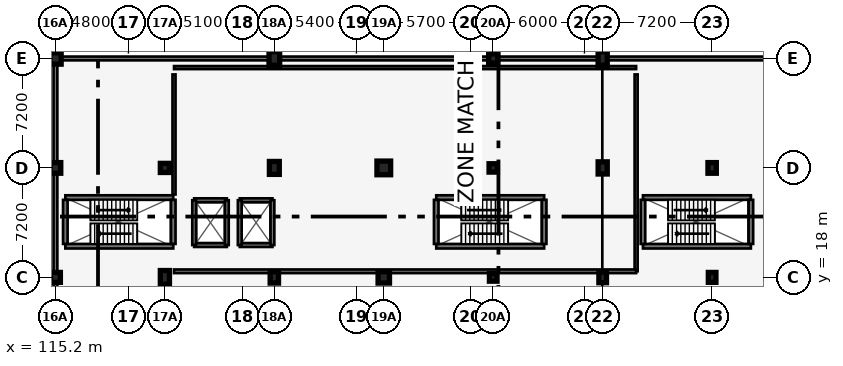
"""IFC4 building model, lengths in metres.
Left out: names, types, materials, properties, quantities, classifications, styles, units other than length and angle.
Written with IfcOpenShell. Run it as: python <this file> out.ifc"""

import sys

from ifc_helpers import new_model, si_unit, direction, frame, frame_2d, origin, origin_2d, place, context, subcontext, project, spatial, rectangle, circle, extrude, element, fill, save


model = new_model("IFC4")
c1 = context("Model", 3, precision=1e-05, world=origin(), true_north=direction((0.0, 1.0)))
c2 = subcontext(c1, "Body", "Model", "MODEL_VIEW")
j1 = project(units=[si_unit("LENGTHUNIT", "METRE"), si_unit("PLANEANGLEUNIT", "RADIAN")], contexts=[c1])
p1 = place(None, origin())
s1 = spatial("IfcSite", under=j1, at=p1, CompositionType="ELEMENT")
p2 = place(p1, origin())
s2 = spatial("IfcBuilding", under=s1, at=p2, CompositionType="ELEMENT")
p3 = place(p2, frame((0.0, 0.0, 13.2)))
s3 = spatial("IfcBuildingStorey", under=s2, at=p3, CompositionType="ELEMENT", Elevation=13.2)
p4 = place(p3, frame((115.2, 18.0, 0.0), z_axis=(0.0, 0.0, 1.0), x_axis=(1.0, 0.0, 0.0)))
e1 = element("IfcColumn", 1, at=p4, inside=s3, PredefinedType="COLUMN", context=c2, shape_type="SweptSolid", body=[
    extrude(rectangle(XDim=0.65, YDim=0.65, at=origin_2d()), origin(), (0.0, 0.0, 1.0), 4.2),
])
p5 = place(p3, frame((115.2, 25.2, 0.0), z_axis=(0.0, 0.0, 1.0), x_axis=(1.0, 0.0, 0.0)))
e2 = element("IfcColumn", 2, at=p5, inside=s3, PredefinedType="COLUMN", context=c2, shape_type="SweptSolid", body=[
    extrude(rectangle(XDim=0.7, YDim=0.7, at=origin_2d()), origin(), (0.0, 0.0, 1.0), 4.2),
])
p6 = place(p3, frame((115.2, 32.4, 0.0), z_axis=(0.0, 0.0, 1.0), x_axis=(1.0, 0.0, 0.0)))
e3 = element("IfcColumn", 3, at=p6, inside=s3, PredefinedType="COLUMN", context=c2, shape_type="SweptSolid", body=[
    extrude(rectangle(XDim=0.75, YDim=0.75, at=origin_2d()), origin(), (0.0, 0.0, 1.0), 4.2),
])
p7 = place(p3, frame((122.4, 18.0, 0.0), z_axis=(0.0, 0.0, 1.0), x_axis=(1.0, 0.0, 0.0)))
e4 = element("IfcColumn", 4, at=p7, inside=s3, PredefinedType="COLUMN", context=c2, shape_type="SweptSolid", body=[
    extrude(rectangle(XDim=0.6, YDim=0.9, at=origin_2d()), origin(), (0.0, 0.0, 1.0), 4.2),
])
p8 = place(p3, frame((122.4, 25.2, 0.0), z_axis=(0.0, 0.0, 1.0), x_axis=(1.0, 0.0, 0.0)))
e5 = element("IfcColumn", 5, at=p8, inside=s3, PredefinedType="COLUMN", context=c2, shape_type="SweptSolid", body=[
    extrude(circle(Radius=0.3, at=origin_2d()), origin(), (0.0, 0.0, 1.0), 4.2),
])
p9 = place(p3, frame((129.6, 18.0, 0.0), z_axis=(0.0, 0.0, 1.0), x_axis=(1.0, 0.0, 0.0)))
e6 = element("IfcColumn", 6, at=p9, inside=s3, PredefinedType="COLUMN", context=c2, shape_type="SweptSolid", body=[
    extrude(rectangle(XDim=0.55, YDim=0.75, at=origin_2d()), origin(), (0.0, 0.0, 1.0), 4.2),
])
p10 = place(p3, frame((129.6, 25.2, 0.0), z_axis=(0.0, 0.0, 1.0), x_axis=(1.0, 0.0, 0.0)))
e7 = element("IfcColumn", 7, at=p10, inside=s3, PredefinedType="COLUMN", context=c2, shape_type="SweptSolid", body=[
    extrude(rectangle(XDim=0.65, YDim=0.85, at=origin_2d()), origin(), (0.0, 0.0, 1.0), 4.2),
])
p11 = place(p3, frame((129.6, 32.4, 0.0), z_axis=(0.0, 0.0, 1.0), x_axis=(1.0, 0.0, 0.0)))
e8 = element("IfcColumn", 8, at=p11, inside=s3, PredefinedType="COLUMN", context=c2, shape_type="SweptSolid", body=[
    extrude(rectangle(XDim=0.7, YDim=0.9, at=origin_2d()), origin(), (0.0, 0.0, 1.0), 4.2),
])
p12 = place(p3, frame((136.8, 18.0, 0.0), z_axis=(0.0, 0.0, 1.0), x_axis=(1.0, 0.0, 0.0)))
e9 = element("IfcColumn", 9, at=p12, inside=s3, PredefinedType="COLUMN", context=c2, shape_type="SweptSolid", body=[
    extrude(circle(Radius=0.375, at=origin_2d()), origin(), (0.0, 0.0, 1.0), 4.2),
])
p13 = place(p3, frame((136.8, 25.2, 0.0), z_axis=(0.0, 0.0, 1.0), x_axis=(1.0, 0.0, 0.0)))
e10 = element("IfcColumn", 10, at=p13, inside=s3, PredefinedType="COLUMN", context=c2, shape_type="SweptSolid", body=[
    extrude(circle(Radius=0.45, at=origin_2d()), origin(), (0.0, 0.0, 1.0), 4.2),
])
p14 = place(p3, frame((144.0, 18.0, 0.0), z_axis=(0.0, 0.0, 1.0), x_axis=(1.0, 0.0, 0.0)))
e11 = element("IfcColumn", 11, at=p14, inside=s3, PredefinedType="COLUMN", context=c2, shape_type="SweptSolid", body=[
    extrude(rectangle(XDim=0.5, YDim=0.5, at=origin_2d()), origin(), (0.0, 0.0, 1.0), 4.2),
])
p15 = place(p3, frame((144.0, 25.2, 0.0), z_axis=(0.0, 0.0, 1.0), x_axis=(1.0, 0.0, 0.0)))
e12 = element("IfcColumn", 12, at=p15, inside=s3, PredefinedType="COLUMN", context=c2, shape_type="SweptSolid", body=[
    extrude(rectangle(XDim=0.55, YDim=0.55, at=origin_2d()), origin(), (0.0, 0.0, 1.0), 4.2),
])
p16 = place(p3, frame((144.0, 32.4, 0.0), z_axis=(0.0, 0.0, 1.0), x_axis=(1.0, 0.0, 0.0)))
e13 = element("IfcColumn", 13, at=p16, inside=s3, PredefinedType="COLUMN", context=c2, shape_type="SweptSolid", body=[
    extrude(rectangle(XDim=0.6, YDim=0.6, at=origin_2d()), origin(), (0.0, 0.0, 1.0), 4.2),
])
p17 = place(p3, frame((151.2, 18.0, 0.0), z_axis=(0.0, 0.0, 1.0), x_axis=(1.0, 0.0, 0.0)))
e14 = element("IfcColumn", 14, at=p17, inside=s3, PredefinedType="COLUMN", context=c2, shape_type="SweptSolid", body=[
    extrude(rectangle(XDim=0.5, YDim=0.7, at=origin_2d()), origin(), (0.0, 0.0, 1.0), 4.2),
])
p18 = place(p3, frame((151.2, 25.2, 0.0), z_axis=(0.0, 0.0, 1.0), x_axis=(1.0, 0.0, 0.0)))
e15 = element("IfcColumn", 15, at=p18, inside=s3, PredefinedType="COLUMN", context=c2, shape_type="SweptSolid", body=[
    extrude(rectangle(XDim=0.6, YDim=0.8, at=origin_2d()), origin(), (0.0, 0.0, 1.0), 4.2),
])
p19 = place(p3, frame((151.2, 32.4, 0.0), z_axis=(0.0, 0.0, 1.0), x_axis=(1.0, 0.0, 0.0)))
e16 = element("IfcColumn", 16, at=p19, inside=s3, PredefinedType="COLUMN", context=c2, shape_type="SweptSolid", body=[
    extrude(rectangle(XDim=0.6, YDim=0.9, at=origin_2d()), origin(), (0.0, 0.0, 1.0), 4.2),
])
p20 = place(p3, frame((158.4, 18.0, 0.0), z_axis=(0.0, 0.0, 1.0), x_axis=(1.0, 0.0, 0.0)))
e17 = element("IfcColumn", 17, at=p20, inside=s3, PredefinedType="COLUMN", context=c2, shape_type="SweptSolid", body=[
    extrude(rectangle(XDim=0.5, YDim=0.65, at=origin_2d()), origin(), (0.0, 0.0, 1.0), 4.2),
])
p21 = place(p3, frame((158.4, 25.2, 0.0), z_axis=(0.0, 0.0, 1.0), x_axis=(1.0, 0.0, 0.0)))
e18 = element("IfcColumn", 18, at=p21, inside=s3, PredefinedType="COLUMN", context=c2, shape_type="SweptSolid", body=[
    extrude(rectangle(XDim=0.55, YDim=0.7, at=origin_2d()), origin(), (0.0, 0.0, 1.0), 4.2),
])
p22 = place(p3, frame((115.2, 32.4, 0.0), z_axis=(0.0, 0.0, 1.0), x_axis=(0.0, -1.0, 0.0)))
e19 = element("IfcWall", 19, at=p22, inside=s3, PredefinedType="SOLIDWALL", context=c2, shape_type="SweptSolid", body=[
    extrude(rectangle(XDim=30.0, YDim=0.25, at=frame_2d((15.0, 0.0))), origin(), (0.0, 0.0, 1.0), 3.253),
])
p23 = place(p22, frame((18.0, 0.0, 0.0)))
e20 = element("IfcOpeningElement", 20, at=p23, cuts=e19, PredefinedType="OPENING", context=c2, shape_type="SweptSolid", body=[
    extrude(rectangle(XDim=1.1, YDim=2.15, at=frame_2d((0.55, 1.075))), frame((0.0, 0.135, 0.0), z_axis=(0.0, -1.0, 0.0), x_axis=(1.0, 0.0, 0.0)), (0.0, 0.0, 1.0), 0.27),
])
p24 = place(p3, frame((165.6, 32.4, 0.0), z_axis=(0.0, 0.0, 1.0), x_axis=(-1.0, 0.0, 0.0)))
e21 = element("IfcWall", 21, at=p24, inside=s3, PredefinedType="SOLIDWALL", context=c2, shape_type="SweptSolid", body=[
    extrude(rectangle(XDim=50.4, YDim=0.25, at=frame_2d((25.2, 0.0))), origin(), (0.0, 0.0, 1.0), 3.35),
])
p25 = place(p24, frame((2.2, 0.0, 0.78)))
e22 = element("IfcOpeningElement", 22, at=p25, cuts=e21, PredefinedType="OPENING", context=c2, shape_type="SweptSolid", body=[
    extrude(rectangle(XDim=1.35, YDim=1.75, at=frame_2d((0.675, 0.875))), frame((0.0, 0.135, 0.0), z_axis=(0.0, -1.0, 0.0), x_axis=(1.0, 0.0, 0.0)), (0.0, 0.0, 1.0), 0.27),
])
p26 = place(p24, frame((9.4, 0.0, 0.78)))
e23 = element("IfcOpeningElement", 23, at=p26, cuts=e21, PredefinedType="OPENING", context=c2, shape_type="SweptSolid", body=[
    extrude(rectangle(XDim=1.5, YDim=1.75, at=frame_2d((0.75, 0.875))), frame((0.0, 0.135, 0.0), z_axis=(0.0, -1.0, 0.0), x_axis=(1.0, 0.0, 0.0)), (0.0, 0.0, 1.0), 0.27),
])
p27 = place(p24, frame((16.6, 0.0, 0.78)))
e24 = element("IfcOpeningElement", 24, at=p27, cuts=e21, PredefinedType="OPENING", context=c2, shape_type="SweptSolid", body=[
    extrude(rectangle(XDim=1.65, YDim=1.8, at=frame_2d((0.825, 0.9))), frame((0.0, 0.135, 0.0), z_axis=(0.0, -1.0, 0.0), x_axis=(1.0, 0.0, 0.0)), (0.0, 0.0, 1.0), 0.27),
])
p28 = place(p24, frame((23.8, 0.0, 0.78)))
e25 = element("IfcOpeningElement", 25, at=p28, cuts=e21, PredefinedType="OPENING", context=c2, shape_type="SweptSolid", body=[
    extrude(rectangle(XDim=1.95, YDim=1.8, at=frame_2d((0.975, 0.9))), frame((0.0, 0.135, 0.0), z_axis=(0.0, -1.0, 0.0), x_axis=(1.0, 0.0, 0.0)), (0.0, 0.0, 1.0), 0.27),
])
p29 = place(p24, frame((31.0, 0.0, 0.78)))
e26 = element("IfcOpeningElement", 26, at=p29, cuts=e21, PredefinedType="OPENING", context=c2, shape_type="SweptSolid", body=[
    extrude(rectangle(XDim=2.1, YDim=1.8, at=frame_2d((1.05, 0.9))), frame((0.0, 0.135, 0.0), z_axis=(0.0, -1.0, 0.0), x_axis=(1.0, 0.0, 0.0)), (0.0, 0.0, 1.0), 0.27),
])
p30 = place(p24, frame((38.2, 0.0, 0.78)))
e27 = element("IfcOpeningElement", 27, at=p30, cuts=e21, PredefinedType="OPENING", context=c2, shape_type="SweptSolid", body=[
    extrude(rectangle(XDim=1.1, YDim=1.65, at=frame_2d((0.55, 0.825))), frame((0.0, 0.135, 0.0), z_axis=(0.0, -1.0, 0.0), x_axis=(1.0, 0.0, 0.0)), (0.0, 0.0, 1.0), 0.27),
])
p31 = place(p3, frame((115.85, 20.05, 0.0), z_axis=(0.0, 0.0, 1.0), x_axis=(1.0, 0.0, 0.0)))
e28 = element("IfcWall", 28, at=p31, inside=s3, PredefinedType="SHEAR", context=c2, shape_type="SweptSolid", body=[
    extrude(rectangle(XDim=7.1, YDim=0.3, at=frame_2d((3.55, 0.0))), origin(), (0.0, 0.0, 1.0), 3.45),
])
p32 = place(p31, frame((0.35, 0.0, 0.0)))
e29 = element("IfcOpeningElement", 29, at=p32, cuts=e28, PredefinedType="OPENING", context=c2, shape_type="SweptSolid", body=[
    extrude(rectangle(XDim=1.07, YDim=2.15, at=frame_2d((0.535, 1.075))), frame((0.0, 0.16, 0.0), z_axis=(0.0, -1.0, 0.0), x_axis=(1.0, 0.0, 0.0)), (0.0, 0.0, 1.0), 0.32),
])
p33 = place(p3, frame((122.95, 23.25, 0.0), z_axis=(0.0, 0.0, 1.0), x_axis=(-1.0, 0.0, 0.0)))
e30 = element("IfcWall", 30, at=p33, inside=s3, PredefinedType="SHEAR", context=c2, shape_type="SweptSolid", body=[
    extrude(rectangle(XDim=7.1, YDim=0.3, at=frame_2d((3.55, 0.0))), origin(), (0.0, 0.0, 1.0), 3.45),
])
for number, where, z_axis, x_axis in (
    (31, (122.95, 20.2, 0.0), (0.0, 0.0, 1.0), (0.0, 1.0, 0.0)),
    (32, (115.85, 23.1, 0.0), (0.0, 0.0, 1.0), (0.0, -1.0, 0.0)),
):
    element("IfcWall", number, at=place(p3, frame(where, z_axis=z_axis, x_axis=x_axis)), inside=s3, PredefinedType="SHEAR", context=c2, shape_type="SweptSolid", body=[
        extrude(rectangle(XDim=2.9, YDim=0.3, at=frame_2d((1.45, 0.0))), origin(), (0.0, 0.0, 1.0), 3.45),
    ])
p34 = place(p3, frame((140.25, 20.05, 0.0), z_axis=(0.0, 0.0, 1.0), x_axis=(1.0, 0.0, 0.0)))
e33 = element("IfcWall", 33, at=p34, inside=s3, PredefinedType="SHEAR", context=c2, shape_type="SweptSolid", body=[
    extrude(rectangle(XDim=7.1, YDim=0.3, at=frame_2d((3.55, 0.0))), origin(), (0.0, 0.0, 1.0), 3.45),
])
p35 = place(p34, frame((0.35, 0.0, 0.0)))
e34 = element("IfcOpeningElement", 34, at=p35, cuts=e33, PredefinedType="OPENING", context=c2, shape_type="SweptSolid", body=[
    extrude(rectangle(XDim=1.07, YDim=2.15, at=frame_2d((0.535, 1.075))), frame((0.0, 0.16, 0.0), z_axis=(0.0, -1.0, 0.0), x_axis=(1.0, 0.0, 0.0)), (0.0, 0.0, 1.0), 0.32),
])
p36 = place(p3, frame((147.35, 23.25, 0.0), z_axis=(0.0, 0.0, 1.0), x_axis=(-1.0, 0.0, 0.0)))
e35 = element("IfcWall", 35, at=p36, inside=s3, PredefinedType="SHEAR", context=c2, shape_type="SweptSolid", body=[
    extrude(rectangle(XDim=7.1, YDim=0.3, at=frame_2d((3.55, 0.0))), origin(), (0.0, 0.0, 1.0), 3.45),
])
for number, where, z_axis, x_axis in (
    (36, (147.35, 20.2, 0.0), (0.0, 0.0, 1.0), (0.0, 1.0, 0.0)),
    (37, (140.25, 23.1, 0.0), (0.0, 0.0, 1.0), (0.0, -1.0, 0.0)),
):
    element("IfcWall", number, at=place(p3, frame(where, z_axis=z_axis, x_axis=x_axis)), inside=s3, PredefinedType="SHEAR", context=c2, shape_type="SweptSolid", body=[
        extrude(rectangle(XDim=2.9, YDim=0.3, at=frame_2d((1.45, 0.0))), origin(), (0.0, 0.0, 1.0), 3.45),
    ])
p37 = place(p3, frame((153.85, 20.05, 0.0), z_axis=(0.0, 0.0, 1.0), x_axis=(1.0, 0.0, 0.0)))
e38 = element("IfcWall", 38, at=p37, inside=s3, PredefinedType="SHEAR", context=c2, shape_type="SweptSolid", body=[
    extrude(rectangle(XDim=7.1, YDim=0.3, at=frame_2d((3.55, 0.0))), origin(), (0.0, 0.0, 1.0), 3.45),
])
p38 = place(p37, frame((0.35, 0.0, 0.0)))
e39 = element("IfcOpeningElement", 39, at=p38, cuts=e38, PredefinedType="OPENING", context=c2, shape_type="SweptSolid", body=[
    extrude(rectangle(XDim=1.07, YDim=2.15, at=frame_2d((0.535, 1.075))), frame((0.0, 0.16, 0.0), z_axis=(0.0, -1.0, 0.0), x_axis=(1.0, 0.0, 0.0)), (0.0, 0.0, 1.0), 0.32),
])
p39 = place(p3, frame((160.95, 23.25, 0.0), z_axis=(0.0, 0.0, 1.0), x_axis=(-1.0, 0.0, 0.0)))
e40 = element("IfcWall", 40, at=p39, inside=s3, PredefinedType="SHEAR", context=c2, shape_type="SweptSolid", body=[
    extrude(rectangle(XDim=7.1, YDim=0.3, at=frame_2d((3.55, 0.0))), origin(), (0.0, 0.0, 1.0), 3.45),
])
for number, where, z_axis, x_axis in (
    (41, (160.95, 20.2, 0.0), (0.0, 0.0, 1.0), (0.0, 1.0, 0.0)),
    (42, (153.85, 23.1, 0.0), (0.0, 0.0, 1.0), (0.0, -1.0, 0.0)),
):
    element("IfcWall", number, at=place(p3, frame(where, z_axis=z_axis, x_axis=x_axis)), inside=s3, PredefinedType="SHEAR", context=c2, shape_type="SweptSolid", body=[
        extrude(rectangle(XDim=2.9, YDim=0.3, at=frame_2d((1.45, 0.0))), origin(), (0.0, 0.0, 1.0), 3.45),
    ])
p40 = place(p3, frame((124.325, 20.125, 0.0), z_axis=(0.0, 0.0, 1.0), x_axis=(1.0, 0.0, 0.0)))
e43 = element("IfcWall", 43, at=p40, inside=s3, PredefinedType="SHEAR", context=c2, shape_type="SweptSolid", body=[
    extrude(rectangle(XDim=2.15, YDim=0.25, at=frame_2d((1.075, 0.0))), origin(), (0.0, 0.0, 1.0), 3.55),
])
p41 = place(p3, frame((126.475, 23.075, 0.0), z_axis=(0.0, 0.0, 1.0), x_axis=(-1.0, 0.0, 0.0)))
e44 = element("IfcWall", 44, at=p41, inside=s3, PredefinedType="SHEAR", context=c2, shape_type="SweptSolid", body=[
    extrude(rectangle(XDim=2.15, YDim=0.25, at=frame_2d((1.075, 0.0))), origin(), (0.0, 0.0, 1.0), 3.55),
])
p42 = place(p41, frame((0.525, 0.0, 0.0)))
e45 = element("IfcOpeningElement", 45, at=p42, cuts=e44, PredefinedType="OPENING", context=c2, shape_type="SweptSolid", body=[
    extrude(rectangle(XDim=1.1, YDim=2.15, at=frame_2d((0.55, 1.075))), frame((0.0, 0.135, 0.0), z_axis=(0.0, -1.0, 0.0), x_axis=(1.0, 0.0, 0.0)), (0.0, 0.0, 1.0), 0.27),
])
for number, where, z_axis, x_axis in (
    (46, (124.325, 23.075, 0.0), (0.0, 0.0, 1.0), (0.0, -1.0, 0.0)),
    (47, (126.475, 20.125, 0.0), (0.0, 0.0, 1.0), (0.0, 1.0, 0.0)),
):
    element("IfcWall", number, at=place(p3, frame(where, z_axis=z_axis, x_axis=x_axis)), inside=s3, PredefinedType="SHEAR", context=c2, shape_type="SweptSolid", body=[
        extrude(rectangle(XDim=2.95, YDim=0.25, at=frame_2d((1.475, 0.0))), origin(), (0.0, 0.0, 1.0), 3.55),
    ])
p43 = place(p3, frame((127.325, 20.125, 0.0), z_axis=(0.0, 0.0, 1.0), x_axis=(1.0, 0.0, 0.0)))
e48 = element("IfcWall", 48, at=p43, inside=s3, PredefinedType="SHEAR", context=c2, shape_type="SweptSolid", body=[
    extrude(rectangle(XDim=2.15, YDim=0.25, at=frame_2d((1.075, 0.0))), origin(), (0.0, 0.0, 1.0), 3.55),
])
p44 = place(p3, frame((129.475, 23.075, 0.0), z_axis=(0.0, 0.0, 1.0), x_axis=(-1.0, 0.0, 0.0)))
e49 = element("IfcWall", 49, at=p44, inside=s3, PredefinedType="SHEAR", context=c2, shape_type="SweptSolid", body=[
    extrude(rectangle(XDim=2.15, YDim=0.25, at=frame_2d((1.075, 0.0))), origin(), (0.0, 0.0, 1.0), 3.55),
])
p45 = place(p44, frame((0.525, 0.0, 0.0)))
e50 = element("IfcOpeningElement", 50, at=p45, cuts=e49, PredefinedType="OPENING", context=c2, shape_type="SweptSolid", body=[
    extrude(rectangle(XDim=1.1, YDim=2.15, at=frame_2d((0.55, 1.075))), frame((0.0, 0.135, 0.0), z_axis=(0.0, -1.0, 0.0), x_axis=(1.0, 0.0, 0.0)), (0.0, 0.0, 1.0), 0.27),
])
for number, where, z_axis, x_axis in (
    (51, (127.325, 23.075, 0.0), (0.0, 0.0, 1.0), (0.0, -1.0, 0.0)),
    (52, (129.475, 20.125, 0.0), (0.0, 0.0, 1.0), (0.0, 1.0, 0.0)),
):
    element("IfcWall", number, at=place(p3, frame(where, z_axis=z_axis, x_axis=x_axis)), inside=s3, PredefinedType="SHEAR", context=c2, shape_type="SweptSolid", body=[
        extrude(rectangle(XDim=2.95, YDim=0.25, at=frame_2d((1.475, 0.0))), origin(), (0.0, 0.0, 1.0), 3.55),
    ])
p46 = place(p3, frame((123.0, 31.8, 0.0), z_axis=(0.0, 0.0, 1.0), x_axis=(1.0, 0.0, 0.0)))
e53 = element("IfcWall", 53, at=p46, inside=s3, PredefinedType="SOLIDWALL", context=c2, shape_type="SweptSolid", body=[
    extrude(rectangle(XDim=30.4, YDim=0.2, at=frame_2d((15.2, 0.0))), origin(), (0.0, 0.0, 1.0), 3.479),
])
p47 = place(p3, frame((153.4, 18.4, 0.0), z_axis=(0.0, 0.0, 1.0), x_axis=(0.0, 1.0, 0.0)))
e54 = element("IfcWall", 54, at=p47, inside=s3, PredefinedType="SOLIDWALL", context=c2, shape_type="SweptSolid", body=[
    extrude(rectangle(XDim=12.95, YDim=0.2, at=frame_2d((6.475, 0.0))), origin(), (0.0, 0.0, 1.0), 3.6),
])
p48 = place(p3, frame((123.0, 31.35, 0.0), z_axis=(0.0, 0.0, 1.0), x_axis=(0.0, -1.0, 0.0)))
e55 = element("IfcWall", 55, at=p48, inside=s3, PredefinedType="SOLIDWALL", context=c2, shape_type="SweptSolid", body=[
    extrude(rectangle(XDim=7.9, YDim=0.2, at=frame_2d((3.95, 0.0))), origin(), (0.0, 0.0, 1.0), 3.6),
])
p49 = place(p3, frame((153.4, 18.4, 0.0), z_axis=(0.0, 0.0, 1.0), x_axis=(-1.0, 0.0, 0.0)))
e56 = element("IfcWall", 56, at=p49, inside=s3, PredefinedType="SOLIDWALL", context=c2, shape_type="SweptSolid", body=[
    extrude(rectangle(XDim=30.4, YDim=0.24, at=frame_2d((15.2, 0.0))), origin(), (0.0, 0.0, 1.0), 3.479),
])
p50 = place(p49, frame((20.16, 0.0, 0.0)))
e57 = element("IfcOpeningElement", 57, at=p50, cuts=e56, PredefinedType="OPENING", context=c2, shape_type="SweptSolid", body=[
    extrude(rectangle(XDim=1.6, YDim=2.15, at=frame_2d((0.8, 1.075))), frame((0.0, 0.13, 0.0), z_axis=(0.0, -1.0, 0.0), x_axis=(1.0, 0.0, 0.0)), (0.0, 0.0, 1.0), 0.26),
])
p51 = place(p49, frame((25.6, 0.0, 0.0)))
e58 = element("IfcOpeningElement", 58, at=p51, cuts=e56, PredefinedType="OPENING", context=c2, shape_type="SweptSolid", body=[
    extrude(rectangle(XDim=1.6, YDim=2.15, at=frame_2d((0.8, 1.075))), frame((0.0, 0.13, 0.0), z_axis=(0.0, -1.0, 0.0), x_axis=(1.0, 0.0, 0.0)), (0.0, 0.0, 1.0), 0.26),
])
p52 = place(p26, origin())
e59 = element("IfcWindow", 59, at=p52, inside=s3, PartitioningType="SINGLE_PANEL", PredefinedType="WINDOW", context=c2, shape_type="SweptSolid", body=[
    extrude(rectangle(XDim=1.5, YDim=1.75, at=frame_2d((0.75, 0.875))), frame((0.0, 0.03, 0.0), z_axis=(0.0, -1.0, 0.0), x_axis=(1.0, 0.0, 0.0)), (0.0, 0.0, 1.0), 0.06),
])
fill(e23, e59)
p53 = place(p27, origin())
e60 = element("IfcWindow", 60, at=p53, inside=s3, PartitioningType="SINGLE_PANEL", PredefinedType="WINDOW", context=c2, shape_type="SweptSolid", body=[
    extrude(rectangle(XDim=1.65, YDim=1.8, at=frame_2d((0.825, 0.9))), frame((0.0, 0.03, 0.0), z_axis=(0.0, -1.0, 0.0), x_axis=(1.0, 0.0, 0.0)), (0.0, 0.0, 1.0), 0.06),
])
fill(e24, e60)
p54 = place(p28, origin())
e61 = element("IfcWindow", 61, at=p54, inside=s3, PartitioningType="SINGLE_PANEL", PredefinedType="WINDOW", context=c2, shape_type="SweptSolid", body=[
    extrude(rectangle(XDim=1.95, YDim=1.8, at=frame_2d((0.975, 0.9))), frame((0.0, 0.03, 0.0), z_axis=(0.0, -1.0, 0.0), x_axis=(1.0, 0.0, 0.0)), (0.0, 0.0, 1.0), 0.06),
])
fill(e25, e61)
p55 = place(p29, origin())
e62 = element("IfcWindow", 62, at=p55, inside=s3, PartitioningType="SINGLE_PANEL", PredefinedType="WINDOW", context=c2, shape_type="SweptSolid", body=[
    extrude(rectangle(XDim=2.1, YDim=1.8, at=frame_2d((1.05, 0.9))), frame((0.0, 0.03, 0.0), z_axis=(0.0, -1.0, 0.0), x_axis=(1.0, 0.0, 0.0)), (0.0, 0.0, 1.0), 0.06),
])
fill(e26, e62)
p56 = place(p30, origin())
e63 = element("IfcWindow", 63, at=p56, inside=s3, PartitioningType="SINGLE_PANEL", PredefinedType="WINDOW", context=c2, shape_type="SweptSolid", body=[
    extrude(rectangle(XDim=1.1, YDim=1.65, at=frame_2d((0.55, 0.825))), frame((0.0, 0.03, 0.0), z_axis=(0.0, -1.0, 0.0), x_axis=(1.0, 0.0, 0.0)), (0.0, 0.0, 1.0), 0.06),
])
fill(e27, e63)
p57 = place(p32, origin())
e64 = element("IfcDoor", 64, at=p57, inside=s3, OperationType="SINGLE_SWING_RIGHT", PredefinedType="DOOR", context=c2, shape_type="SweptSolid", body=[
    extrude(rectangle(XDim=1.07, YDim=2.15, at=frame_2d((0.535, 1.075))), frame((0.0, 0.025, 0.0), z_axis=(0.0, -1.0, 0.0), x_axis=(1.0, 0.0, 0.0)), (0.0, 0.0, 1.0), 0.05),
])
fill(e29, e64)
p58 = place(p35, origin())
e65 = element("IfcDoor", 65, at=p58, inside=s3, OperationType="SINGLE_SWING_RIGHT", PredefinedType="DOOR", context=c2, shape_type="SweptSolid", body=[
    extrude(rectangle(XDim=1.07, YDim=2.15, at=frame_2d((0.535, 1.075))), frame((0.0, 0.025, 0.0), z_axis=(0.0, -1.0, 0.0), x_axis=(1.0, 0.0, 0.0)), (0.0, 0.0, 1.0), 0.05),
])
fill(e34, e65)
p59 = place(p38, origin())
e66 = element("IfcDoor", 66, at=p59, inside=s3, OperationType="SINGLE_SWING_RIGHT", PredefinedType="DOOR", context=c2, shape_type="SweptSolid", body=[
    extrude(rectangle(XDim=1.07, YDim=2.15, at=frame_2d((0.535, 1.075))), frame((0.0, 0.025, 0.0), z_axis=(0.0, -1.0, 0.0), x_axis=(1.0, 0.0, 0.0)), (0.0, 0.0, 1.0), 0.05),
])
fill(e39, e66)
p60 = place(p42, origin())
e67 = element("IfcDoor", 67, at=p60, inside=s3, OperationType="SLIDING_TO_LEFT", PredefinedType="DOOR", context=c2, shape_type="SweptSolid", body=[
    extrude(rectangle(XDim=1.1, YDim=2.15, at=frame_2d((0.55, 1.075))), frame((0.0, 0.025, 0.0), z_axis=(0.0, -1.0, 0.0), x_axis=(1.0, 0.0, 0.0)), (0.0, 0.0, 1.0), 0.05),
])
fill(e45, e67)
p61 = place(p45, origin())
e68 = element("IfcDoor", 68, at=p61, inside=s3, OperationType="SLIDING_TO_LEFT", PredefinedType="DOOR", context=c2, shape_type="SweptSolid", body=[
    extrude(rectangle(XDim=1.1, YDim=2.15, at=frame_2d((0.55, 1.075))), frame((0.0, 0.025, 0.0), z_axis=(0.0, -1.0, 0.0), x_axis=(1.0, 0.0, 0.0)), (0.0, 0.0, 1.0), 0.05),
])
fill(e50, e68)
p62 = place(p50, origin())
e69 = element("IfcDoor", 69, at=p62, inside=s3, OperationType="DOUBLE_SWING_RIGHT", PredefinedType="DOOR", context=c2, shape_type="SweptSolid", body=[
    extrude(rectangle(XDim=1.6, YDim=2.15, at=frame_2d((0.8, 1.075))), frame((0.0, 0.025, 0.0), z_axis=(0.0, -1.0, 0.0), x_axis=(1.0, 0.0, 0.0)), (0.0, 0.0, 1.0), 0.05),
])
fill(e57, e69)
p63 = place(p51, origin())
e70 = element("IfcDoor", 70, at=p63, inside=s3, OperationType="DOUBLE_SWING_RIGHT", PredefinedType="DOOR", context=c2, shape_type="SweptSolid", body=[
    extrude(rectangle(XDim=1.6, YDim=2.15, at=frame_2d((0.8, 1.075))), frame((0.0, 0.025, 0.0), z_axis=(0.0, -1.0, 0.0), x_axis=(1.0, 0.0, 0.0)), (0.0, 0.0, 1.0), 0.05),
])
fill(e58, e70)
save(model, sys.argv[1])
